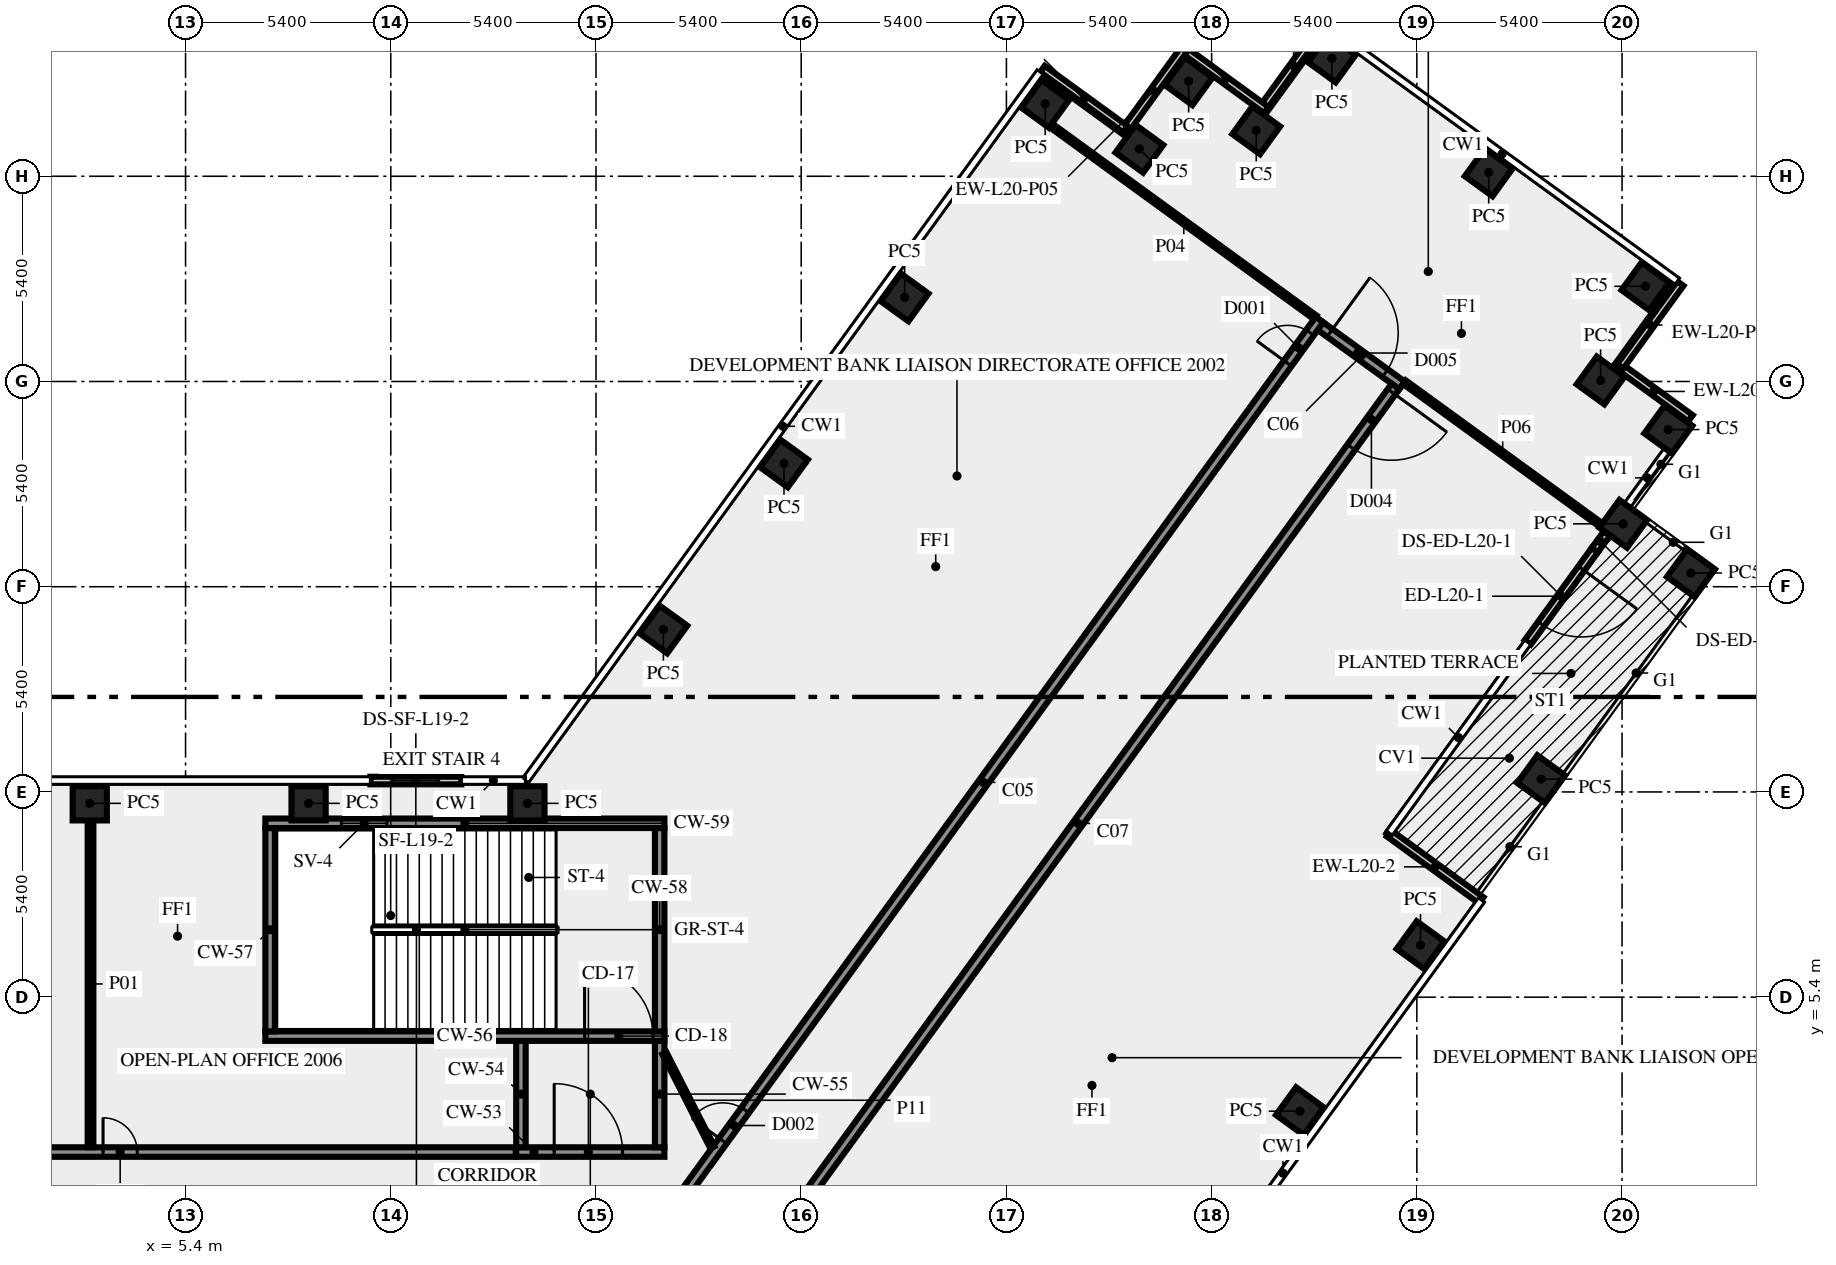
"""IFC4 building model, lengths in metres.
Left out: names, types, materials, properties, quantities, classifications, styles, units other than length and angle.
Written with IfcOpenShell. Run it as: python <this file> out.ifc"""

import sys

from ifc_helpers import new_model, si_unit, direction, frame, frame_2d, origin, origin_2d, place, context, subcontext, project, spatial, rectangle, extrude, element, fill, save


model = new_model("IFC4")
c1 = context("Model", 3, precision=1e-05, world=origin(), true_north=direction((0.0, 1.0)))
c2 = subcontext(c1, "Body", "Model", "MODEL_VIEW")
j1 = project(units=[si_unit("LENGTHUNIT", "METRE"), si_unit("PLANEANGLEUNIT", "RADIAN")], contexts=[c1])
p1 = place(None, origin())
s1 = spatial("IfcSite", under=j1, at=p1, CompositionType="ELEMENT")
p2 = place(p1, origin())
s2 = spatial("IfcBuilding", under=s1, at=p2, CompositionType="ELEMENT")
p3 = place(p2, frame((0.0, 0.0, 89.0)))
s3 = spatial("IfcBuildingStorey", under=s2, at=p3, CompositionType="ELEMENT", Elevation=89.0)
for number, where, z_axis, x_axis in (
    (1, (34.722, 2.4, 0.0), (0.0, 0.0, 1.0), (0.588, 0.809, 0.0)),
    (2, (37.896, 6.769, 0.0), (0.0, 0.0, 1.0), (0.588, 0.809, 0.0)),
    (3, (41.07, 11.137, 0.0), (0.0, 0.0, 1.0), (0.588, 0.809, 0.0)),
    (4, (45.01, 16.56, 0.0), (0.0, 0.0, 1.0), (0.588, 0.809, 0.0)),
    (5, (43.231, 17.854, 0.0), (0.0, 0.0, 1.0), (0.588, 0.809, 0.0)),
    (6, (44.415, 20.335, 0.0), (0.0, 0.0, 1.0), (0.588, 0.809, 0.0)),
    (7, (42.635, 21.626, 0.0), (0.0, 0.0, 1.0), (-0.809, 0.588, 0.0)),
    (8, (43.815, 24.105, 0.0), (0.0, 0.0, 1.0), (-0.809, 0.588, 0.0)),
    (9, (39.691, 27.102, 0.0), (0.0, 0.0, 1.0), (-0.809, 0.588, 0.0)),
    (10, (35.565, 30.1, 0.0), (0.0, 0.0, 1.0), (-0.588, -0.809, 0.0)),
    (11, (33.574, 28.209, 0.0), (0.0, 0.0, 1.0), (-0.809, 0.588, 0.0)),
    (12, (31.795, 29.5, 0.0), (0.0, 0.0, 1.0), (-0.588, -0.809, 0.0)),
    (13, (30.499, 27.723, 0.0), (0.0, 0.0, 1.0), (-0.809, 0.588, 0.0)),
    (14, (28.02, 28.905, 0.0), (0.0, 0.0, 1.0), (-0.809, 0.588, 0.0)),
    (15, (24.321, 23.812, 0.0), (0.0, 0.0, 1.0), (-0.588, -0.809, 0.0)),
    (16, (21.147, 19.444, 0.0), (0.0, 0.0, 1.0), (-0.588, -0.809, 0.0)),
    (17, (17.974, 15.075, 0.0), (0.0, 0.0, 1.0), (-0.588, -0.809, 0.0)),
    (18, (14.395, 10.5, 0.0), (0.0, 0.0, 1.0), (-1.0, 0.0, 0.0)),
    (19, (8.637, 10.5, 0.0), (0.0, 0.0, 1.0), (-1.0, 0.0, 0.0)),
    (20, (2.879, 10.5, 0.0), (0.0, 0.0, 1.0), (-1.0, 0.0, 0.0)),
):
    element("IfcColumn", number, at=place(p3, frame(where, z_axis=z_axis, x_axis=x_axis)), inside=s3, PredefinedType="COLUMN", context=c2, shape_type="SweptSolid", body=[
        extrude(rectangle(XDim=0.9, YDim=0.9, at=origin_2d()), origin(), (0.0, 0.0, 1.0), 3.65),
    ])
p4 = place(p3, frame((39.494, 7.947, 0.0), z_axis=(0.0, 0.0, 1.0), x_axis=(-0.808999938455, 0.587808727036, 0.0)))
e21 = element("IfcWall", 21, at=p4, inside=s3, PredefinedType="SOLIDWALL", context=c2, shape_type="SweptSolid", body=[
    extrude(rectangle(XDim=3.0, YDim=0.2, at=frame_2d((1.5, 0.0))), origin(), (0.0, 0.0, 1.0), 3.65),
])
p5 = place(p3, frame((42.482, 17.164, 0.0), z_axis=(0.0, 0.0, 1.0), x_axis=(-0.587808727036, -0.808999938455, 0.0)))
e22 = element("IfcWall", 22, at=p5, inside=s3, PredefinedType="SOLIDWALL", context=c2, shape_type="SweptSolid", body=[
    extrude(rectangle(XDim=3.0, YDim=0.2, at=frame_2d((1.5, 0.0))), origin(), (0.0, 0.0, 1.0), 3.65),
])
p6 = place(p5, frame((0.6, 0.0, 0.0)))
e23 = element("IfcOpeningElement", 23, at=p6, cuts=e22, PredefinedType="OPENING", context=c2, shape_type="SweptSolid", body=[
    extrude(rectangle(XDim=1.8, YDim=2.4, at=frame_2d((0.9, 1.2))), frame((0.0, 0.11, 0.0), z_axis=(0.0, -1.0, 0.0), x_axis=(1.0, 0.0, 0.0)), (0.0, 0.0, 1.0), 0.22),
])
p7 = place(p3, frame((45.002, 20.632, 0.0), z_axis=(0.0, 0.0, 1.0), x_axis=(-0.809026317077, 0.587772420479, 0.0)))
e24 = element("IfcWall", 24, at=p7, inside=s3, PredefinedType="SOLIDWALL", context=c2, shape_type="SweptSolid", body=[
    extrude(rectangle(XDim=2.4, YDim=0.2, at=frame_2d((1.2, 0.0))), origin(), (0.0, 0.0, 1.0), 3.65),
])
for number, where, z_axis, x_axis in (
    (25, (43.149, 21.994, 0.0), (0.0, 0.0, 1.0), (0.588, 0.809, 0.0)),
    (26, (35.351, 30.997, 0.0), (0.0, 0.0, 1.0), (-0.588, -0.809, 0.0)),
    (27, (33.838, 28.744, 0.0), (0.0, 0.0, 1.0), (-0.809, 0.588, 0.0)),
    (28, (31.67, 30.333, 0.0), (0.0, 0.0, 1.0), (-0.588, -0.809, 0.0)),
    (29, (30.133, 28.237, 0.0), (0.0, 0.0, 1.0), (-0.809, 0.588, 0.0)),
):
    element("IfcWall", number, at=place(p3, frame(where, z_axis=z_axis, x_axis=x_axis)), inside=s3, PredefinedType="SOLIDWALL", context=c2, shape_type="SweptSolid", body=[
        extrude(rectangle(XDim=2.7, YDim=0.2, at=frame_2d((1.35, 0.0))), origin(), (0.0, 0.0, 1.0), 3.65),
    ])
p8 = place(p3, frame((12.655, 11.1, 0.0), z_axis=(0.0, 0.0, 1.0), x_axis=(-1.0, 0.0, 0.0)))
e30 = element("IfcWall", 30, at=p8, inside=s3, PredefinedType="SOLIDWALL", context=c2, shape_type="SweptSolid", body=[
    extrude(rectangle(XDim=2.392, YDim=0.2, at=frame_2d((1.196, 0.0))), origin(), (0.0, 0.0, 1.0), 3.65),
])
p9 = place(p8, frame((0.596, 0.0, 1.0)))
e31 = element("IfcOpeningElement", 31, at=p9, cuts=e30, PredefinedType="OPENING", context=c2, shape_type="SweptSolid", body=[
    extrude(rectangle(XDim=1.2, YDim=1.2, at=frame_2d((0.6, 0.6))), frame((0.0, 0.11, 0.0), z_axis=(0.0, -1.0, 0.0), x_axis=(1.0, 0.0, 0.0)), (0.0, 0.0, 1.0), 0.22),
])
p10 = place(p3, frame((14.1, 1.325, 0.0), z_axis=(0.0, 0.0, 1.0), x_axis=(1.0, 0.0, 0.0)))
e32 = element("IfcWall", 32, at=p10, inside=s3, PredefinedType="SHEAR", context=c2, shape_type="SweptSolid", body=[
    extrude(rectangle(XDim=3.9, YDim=0.25, at=frame_2d((1.95, 0.0))), origin(), (0.0, 0.0, 1.0), 3.65),
])
p11 = place(p10, frame((1.0, 0.0, 0.0)))
e33 = element("IfcOpeningElement", 33, at=p11, cuts=e32, PredefinedType="OPENING", context=c2, shape_type="SweptSolid", body=[
    extrude(rectangle(XDim=1.8, YDim=2.1, at=frame_2d((0.9, 1.05))), frame((0.0, 0.135, 0.0), z_axis=(0.0, -1.0, 0.0), x_axis=(1.0, 0.0, 0.0)), (0.0, 0.0, 1.0), 0.27),
])
for number, where, z_axis, x_axis in (
    (34, (14.225, 1.45, 0.0), (0.0, 0.0, 1.0), (0.0, 1.0, 0.0)),
    (35, (17.875, 1.45, 0.0), (0.0, 0.0, 1.0), (0.0, 1.0, 0.0)),
):
    element("IfcWall", number, at=place(p3, frame(where, z_axis=z_axis, x_axis=x_axis)), inside=s3, PredefinedType="SHEAR", context=c2, shape_type="SweptSolid", body=[
        extrude(rectangle(XDim=2.8, YDim=0.25, at=frame_2d((1.4, 0.0))), origin(), (0.0, 0.0, 1.0), 3.65),
    ])
p12 = place(p3, frame((7.5, 4.375, 0.0), z_axis=(0.0, 0.0, 1.0), x_axis=(1.0, 0.0, 0.0)))
e36 = element("IfcWall", 36, at=p12, inside=s3, PredefinedType="SHEAR", context=c2, shape_type="SweptSolid", body=[
    extrude(rectangle(XDim=10.5, YDim=0.25, at=frame_2d((5.25, 0.0))), origin(), (0.0, 0.0, 1.0), 3.65),
])
p13 = place(p12, frame((8.4, 0.0, 0.0)))
e37 = element("IfcOpeningElement", 37, at=p13, cuts=e36, PredefinedType="OPENING", context=c2, shape_type="SweptSolid", body=[
    extrude(rectangle(XDim=1.8, YDim=2.1, at=frame_2d((0.9, 1.05))), frame((0.0, 0.135, 0.0), z_axis=(0.0, -1.0, 0.0), x_axis=(1.0, 0.0, 0.0)), (0.0, 0.0, 1.0), 0.27),
])
for number, where, z_axis, x_axis in (
    (38, (7.625, 4.5, 0.0), (0.0, 0.0, 1.0), (0.0, 1.0, 0.0)),
    (39, (17.875, 4.5, 0.0), (0.0, 0.0, 1.0), (0.0, 1.0, 0.0)),
):
    element("IfcWall", number, at=place(p3, frame(where, z_axis=z_axis, x_axis=x_axis)), inside=s3, PredefinedType="SHEAR", context=c2, shape_type="SweptSolid", body=[
        extrude(rectangle(XDim=5.35, YDim=0.25, at=frame_2d((2.675, 0.0))), origin(), (0.0, 0.0, 1.0), 3.65),
    ])
p14 = place(p3, frame((7.5, 9.975, 0.0), z_axis=(0.0, 0.0, 1.0), x_axis=(1.0, 0.0, 0.0)))
e40 = element("IfcWall", 40, at=p14, inside=s3, PredefinedType="SHEAR", context=c2, shape_type="SweptSolid", body=[
    extrude(rectangle(XDim=10.5, YDim=0.25, at=frame_2d((5.25, 0.0))), origin(), (0.0, 0.0, 1.0), 3.65),
])
p15 = place(p14, frame((2.0, 0.0, 1.0)))
e41 = element("IfcOpeningElement", 41, at=p15, cuts=e40, PredefinedType="OPENING", context=c2, shape_type="SweptSolid", body=[
    extrude(rectangle(XDim=1.2, YDim=1.2, at=frame_2d((0.6, 0.6))), frame((0.0, 0.135, 0.0), z_axis=(0.0, -1.0, 0.0), x_axis=(1.0, 0.0, 0.0)), (0.0, 0.0, 1.0), 0.27),
])
p16 = place(p3, frame((-14.09, 1.325, 0.0), z_axis=(0.0, 0.0, 1.0), x_axis=(1.0, 0.0, 0.0)))
e42 = element("IfcWall", 42, at=p16, inside=s3, PredefinedType="SOLIDWALL", context=c2, shape_type="SweptSolid", body=[
    extrude(rectangle(XDim=28.18, YDim=0.25, at=frame_2d((14.09, 0.0))), origin(), (0.0, 0.0, 1.0), 3.65),
])
p17 = place(p16, frame((17.319, 0.0, 0.0)))
e43 = element("IfcOpeningElement", 43, at=p17, cuts=e42, PredefinedType="OPENING", context=c2, shape_type="SweptSolid", body=[
    extrude(rectangle(XDim=0.9, YDim=2.1, at=frame_2d((0.45, 1.05))), frame((0.0, 0.135, 0.0), z_axis=(0.0, -1.0, 0.0), x_axis=(1.0, 0.0, 0.0)), (0.0, 0.0, 1.0), 0.27),
])
p18 = place(p16, frame((0.34, 0.0, 0.0)))
e44 = element("IfcOpeningElement", 44, at=p18, cuts=e42, PredefinedType="OPENING", context=c2, shape_type="SweptSolid", body=[
    extrude(rectangle(XDim=0.9, YDim=2.1, at=frame_2d((0.45, 1.05))), frame((0.0, 0.135, 0.0), z_axis=(0.0, -1.0, 0.0), x_axis=(1.0, 0.0, 0.0)), (0.0, 0.0, 1.0), 0.27),
])
p19 = place(p3, frame((17.545, -1.125, 0.0), z_axis=(0.0, 0.0, 1.0), x_axis=(0.587786330937, 0.809016210693, 0.0)))
e45 = element("IfcWall", 45, at=p19, inside=s3, PredefinedType="SOLIDWALL", context=c2, shape_type="SweptSolid", body=[
    extrude(rectangle(XDim=30.103, YDim=0.25, at=frame_2d((15.052, 0.0))), origin(), (0.0, 0.0, 1.0), 3.65),
])
p20 = place(p19, frame((28.679, 0.0, 0.0)))
e46 = element("IfcOpeningElement", 46, at=p20, cuts=e45, PredefinedType="OPENING", context=c2, shape_type="SweptSolid", body=[
    extrude(rectangle(XDim=1.0, YDim=2.1, at=frame_2d((0.5, 1.05))), frame((0.0, 0.135, 0.0), z_axis=(0.0, -1.0, 0.0), x_axis=(1.0, 0.0, 0.0)), (0.0, 0.0, 1.0), 0.27),
])
p21 = place(p19, frame((3.391, 0.0, 0.0)))
e47 = element("IfcOpeningElement", 47, at=p21, cuts=e45, PredefinedType="OPENING", context=c2, shape_type="SweptSolid", body=[
    extrude(rectangle(XDim=1.0, YDim=2.1, at=frame_2d((0.5, 1.05))), frame((0.0, 0.135, 0.0), z_axis=(0.0, -1.0, 0.0), x_axis=(1.0, 0.0, 0.0)), (0.0, 0.0, 1.0), 0.27),
])
p22 = place(p3, frame((35.267, 23.054, 0.0), z_axis=(0.0, 0.0, 1.0), x_axis=(0.809038743598, -0.587755315891, 0.0)))
e48 = element("IfcWall", 48, at=p22, inside=s3, PredefinedType="SOLIDWALL", context=c2, shape_type="SweptSolid", body=[
    extrude(rectangle(XDim=2.65, YDim=0.25, at=frame_2d((1.325, 0.0))), origin(), (0.0, 0.0, 1.0), 3.65),
])
p23 = place(p22, frame((0.3, 0.0, 0.0)))
e49 = element("IfcOpeningElement", 49, at=p23, cuts=e48, PredefinedType="OPENING", context=c2, shape_type="SweptSolid", body=[
    extrude(rectangle(XDim=1.8, YDim=2.1, at=frame_2d((0.9, 1.05))), frame((0.0, 0.135, 0.0), z_axis=(0.0, -1.0, 0.0), x_axis=(1.0, 0.0, 0.0)), (0.0, 0.0, 1.0), 0.27),
])
p24 = place(p3, frame((37.236, 21.469, 0.0), z_axis=(0.0, 0.0, 1.0), x_axis=(-0.58778344073, -0.809018310549, 0.0)))
e50 = element("IfcWall", 50, at=p24, inside=s3, PredefinedType="SOLIDWALL", context=c2, shape_type="SweptSolid", body=[
    extrude(rectangle(XDim=28.42, YDim=0.25, at=frame_2d((14.21, 0.0))), origin(), (0.0, 0.0, 1.0), 3.65),
])
p25 = place(p24, frame((26.137, 0.0, 0.0)))
e51 = element("IfcOpeningElement", 51, at=p25, cuts=e50, PredefinedType="OPENING", context=c2, shape_type="SweptSolid", body=[
    extrude(rectangle(XDim=1.8, YDim=2.1, at=frame_2d((0.9, 1.05))), frame((0.0, 0.135, 0.0), z_axis=(0.0, -1.0, 0.0), x_axis=(1.0, 0.0, 0.0)), (0.0, 0.0, 1.0), 0.27),
])
p26 = place(p24, frame((0.175, 0.0, 0.0)))
e52 = element("IfcOpeningElement", 52, at=p26, cuts=e50, PredefinedType="OPENING", context=c2, shape_type="SweptSolid", body=[
    extrude(rectangle(XDim=1.8, YDim=2.1, at=frame_2d((0.9, 1.05))), frame((0.0, 0.135, 0.0), z_axis=(0.0, -1.0, 0.0), x_axis=(1.0, 0.0, 0.0)), (0.0, 0.0, 1.0), 0.27),
])
p27 = place(p3, frame((2.899, 10.045, 0.0), z_axis=(0.0, 0.0, 1.0), x_axis=(0.0, -1.0, 0.0)))
e53 = element("IfcWall", 53, at=p27, inside=s3, PredefinedType="PARTITIONING", context=c2, shape_type="SweptSolid", body=[
    extrude(rectangle(XDim=8.595, YDim=0.15, at=frame_2d((4.297, 0.0))), origin(), (0.0, 0.0, 1.0), 3.65),
])
p28 = place(p3, frame((35.126, 23.286, 0.0), z_axis=(0.0, 0.0, 1.0), x_axis=(-0.80904590842, 0.587745453465, 0.0)))
e54 = element("IfcWall", 54, at=p28, inside=s3, PredefinedType="PARTITIONING", context=c2, shape_type="SweptSolid", body=[
    extrude(rectangle(XDim=8.55, YDim=0.12, at=frame_2d((4.275, 0.0))), origin(), (0.0, 0.0, 1.0), 3.65),
])
p29 = place(p3, frame((42.646, 17.823, 0.0), z_axis=(0.0, 0.0, 1.0), x_axis=(-0.809038102754, 0.587756198004, 0.0)))
e55 = element("IfcWall", 55, at=p29, inside=s3, PredefinedType="PARTITIONING", context=c2, shape_type="SweptSolid", body=[
    extrude(rectangle(XDim=6.395, YDim=0.12, at=frame_2d((3.197, 0.0))), origin(), (0.0, 0.0, 1.0), 3.65),
])
p30 = place(p3, frame((18.0, 3.925, 0.0), z_axis=(0.0, 0.0, 1.0), x_axis=(0.453950796792, -0.891026752736, 0.0)))
e56 = element("IfcWall", 56, at=p30, inside=s3, PredefinedType="PARTITIONING", context=c2, shape_type="SweptSolid", body=[
    extrude(rectangle(XDim=2.778, YDim=0.12, at=frame_2d((1.389, 0.0))), origin(), (0.0, 0.0, 1.0), 3.65),
])
p31 = place(p3, frame((42.482, 17.164, 0.0), z_axis=(0.0, 0.0, 1.0), x_axis=(0.58771776895, 0.809066019593, 0.0)))
e57 = element("IfcWall", 57, at=p31, inside=s3, PredefinedType="SOLIDWALL", context=c2, shape_type="SweptSolid", body=[
    extrude(rectangle(XDim=0.544, YDim=0.2, at=frame_2d((0.272, 0.0))), origin(), (0.0, 0.0, 1.0), 3.65),
])
p32 = place(p6, origin())
e58 = element("IfcDoor", 58, at=p32, inside=s3, OperationType="DOUBLE_DOOR_SINGLE_SWING", PredefinedType="DOOR", context=c2, shape_type="SweptSolid", body=[
    extrude(rectangle(XDim=1.8, YDim=2.4, at=frame_2d((0.9, 1.2))), frame((0.0, 0.025, 0.0), z_axis=(0.0, -1.0, 0.0), x_axis=(1.0, 0.0, 0.0)), (0.0, 0.0, 1.0), 0.05),
])
fill(e23, e58)
p33 = place(p9, origin())
e59 = element("IfcWindow", 59, at=p33, inside=s3, PartitioningType="SINGLE_PANEL", PredefinedType="WINDOW", context=c2, shape_type="SweptSolid", body=[
    extrude(rectangle(XDim=1.2, YDim=1.2, at=frame_2d((0.6, 0.6))), frame((0.0, 0.03, 0.0), z_axis=(0.0, -1.0, 0.0), x_axis=(1.0, 0.0, 0.0)), (0.0, 0.0, 1.0), 0.06),
])
fill(e31, e59)
p34 = place(p11, origin())
e60 = element("IfcDoor", 60, at=p34, inside=s3, OperationType="DOUBLE_DOOR_SINGLE_SWING", PredefinedType="DOOR", context=c2, shape_type="SweptSolid", body=[
    extrude(rectangle(XDim=1.8, YDim=2.1, at=frame_2d((0.9, 1.05))), frame((0.0, 0.025, 0.0), z_axis=(0.0, -1.0, 0.0), x_axis=(1.0, 0.0, 0.0)), (0.0, 0.0, 1.0), 0.05),
])
fill(e33, e60)
p35 = place(p13, origin())
e61 = element("IfcDoor", 61, at=p35, inside=s3, OperationType="DOUBLE_DOOR_SINGLE_SWING", PredefinedType="DOOR", context=c2, shape_type="SweptSolid", body=[
    extrude(rectangle(XDim=1.8, YDim=2.1, at=frame_2d((0.9, 1.05))), frame((0.0, 0.025, 0.0), z_axis=(0.0, -1.0, 0.0), x_axis=(1.0, 0.0, 0.0)), (0.0, 0.0, 1.0), 0.05),
])
fill(e37, e61)
p36 = place(p15, origin())
e62 = element("IfcWindow", 62, at=p36, inside=s3, PartitioningType="SINGLE_PANEL", PredefinedType="WINDOW", context=c2, shape_type="SweptSolid", body=[
    extrude(rectangle(XDim=1.2, YDim=1.2, at=frame_2d((0.6, 0.6))), frame((0.0, 0.03, 0.0), z_axis=(0.0, -1.0, 0.0), x_axis=(1.0, 0.0, 0.0)), (0.0, 0.0, 1.0), 0.06),
])
fill(e41, e62)
p37 = place(p17, origin())
e63 = element("IfcDoor", 63, at=p37, inside=s3, OperationType="SINGLE_SWING_LEFT", PredefinedType="DOOR", context=c2, shape_type="SweptSolid", body=[
    extrude(rectangle(XDim=0.9, YDim=2.1, at=frame_2d((0.45, 1.05))), frame((0.0, 0.025, 0.0), z_axis=(0.0, -1.0, 0.0), x_axis=(1.0, 0.0, 0.0)), (0.0, 0.0, 1.0), 0.05),
])
fill(e43, e63)
p38 = place(p20, origin())
e64 = element("IfcDoor", 64, at=p38, inside=s3, OperationType="SINGLE_SWING_RIGHT", PredefinedType="DOOR", context=c2, shape_type="SweptSolid", body=[
    extrude(rectangle(XDim=1.0, YDim=2.1, at=frame_2d((0.5, 1.05))), frame((0.0, 0.025, 0.0), z_axis=(0.0, -1.0, 0.0), x_axis=(1.0, 0.0, 0.0)), (0.0, 0.0, 1.0), 0.05),
])
fill(e46, e64)
p39 = place(p21, origin())
e65 = element("IfcDoor", 65, at=p39, inside=s3, OperationType="SINGLE_SWING_LEFT", PredefinedType="DOOR", context=c2, shape_type="SweptSolid", body=[
    extrude(rectangle(XDim=1.0, YDim=2.1, at=frame_2d((0.5, 1.05))), frame((0.0, 0.025, 0.0), z_axis=(0.0, -1.0, 0.0), x_axis=(1.0, 0.0, 0.0)), (0.0, 0.0, 1.0), 0.05),
])
fill(e47, e65)
p40 = place(p26, origin())
e66 = element("IfcDoor", 66, at=p40, inside=s3, OperationType="DOUBLE_DOOR_SINGLE_SWING", PredefinedType="DOOR", context=c2, shape_type="SweptSolid", body=[
    extrude(rectangle(XDim=1.8, YDim=2.1, at=frame_2d((0.9, 1.05))), frame((0.0, 0.025, 0.0), z_axis=(0.0, -1.0, 0.0), x_axis=(1.0, 0.0, 0.0)), (0.0, 0.0, 1.0), 0.05),
])
fill(e52, e66)
p41 = place(p23, origin())
e67 = element("IfcDoor", 67, at=p41, inside=s3, OperationType="DOUBLE_DOOR_SINGLE_SWING", PredefinedType="DOOR", context=c2, shape_type="SweptSolid", body=[
    extrude(rectangle(XDim=1.8, YDim=2.1, at=frame_2d((0.9, 1.05))), frame((0.0, 0.025, 0.0), z_axis=(0.0, -1.0, 0.0), x_axis=(1.0, 0.0, 0.0)), (0.0, 0.0, 1.0), 0.05),
])
fill(e49, e67)
save(model, sys.argv[1])
